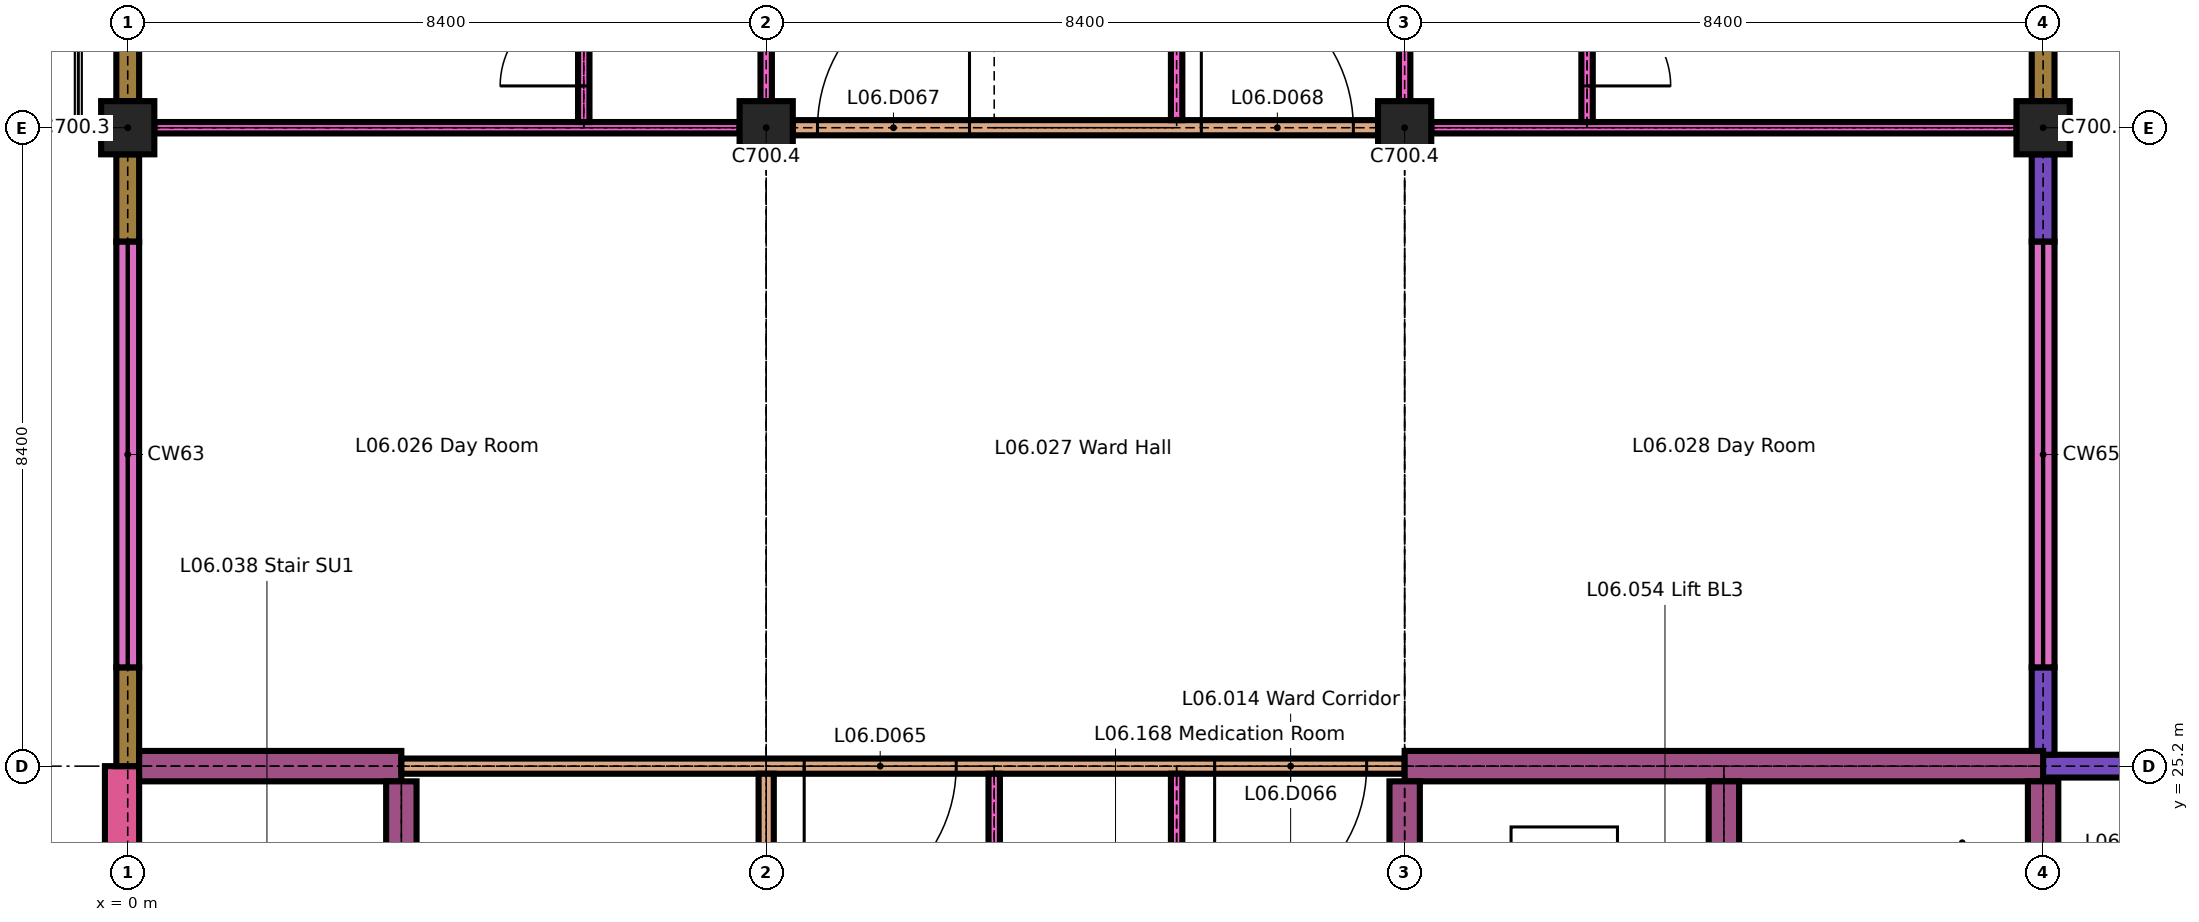
"""IFC4 building model, lengths in metres.
Left out: names, types, materials, properties, quantities, classifications, styles, units other than length and angle.
Written with IfcOpenShell. Run it as: python <this file> out.ifc"""

import sys

from ifc_helpers import new_model, si_unit, direction, frame, frame_2d, origin, origin_2d, place, context, subcontext, project, spatial, rectangle, extrude, element, fill, save


model = new_model("IFC4")
c1 = context("Model", 3, precision=1e-05, world=origin(), true_north=direction((0.0, 1.0)))
c2 = subcontext(c1, "Body", "Model", "MODEL_VIEW")
j1 = project(units=[si_unit("LENGTHUNIT", "METRE"), si_unit("PLANEANGLEUNIT", "RADIAN")], contexts=[c1])
p1 = place(None, origin())
s1 = spatial("IfcSite", under=j1, at=p1, CompositionType="ELEMENT")
p2 = place(p1, origin())
s2 = spatial("IfcBuilding", under=s1, at=p2, CompositionType="ELEMENT")
p3 = place(p2, frame((0.0, 0.0, 26.1)))
s3 = spatial("IfcBuildingStorey", under=s2, at=p3, CompositionType="ELEMENT", Elevation=26.1)
p4 = place(p3, frame((0.0, 33.6, 0.0), z_axis=(0.0, 0.0, 1.0), x_axis=(1.0, 0.0, 0.0)))
e1 = element("IfcColumn", 1, at=p4, inside=s3, PredefinedType="COLUMN", context=c2, shape_type="SweptSolid", body=[
    extrude(rectangle(XDim=0.7, YDim=0.7, at=origin_2d()), origin(), (0.0, 0.0, 1.0), 3.2),
])
for number, where, z_axis, x_axis in (
    (2, (8.4, 33.6, 0.0), (0.0, 0.0, 1.0), (1.0, 0.0, 0.0)),
    (3, (16.8, 33.6, 0.0), (0.0, 0.0, 1.0), (1.0, 0.0, 0.0)),
):
    element("IfcColumn", number, at=place(p3, frame(where, z_axis=z_axis, x_axis=x_axis)), inside=s3, PredefinedType="COLUMN", context=c2, shape_type="SweptSolid", body=[
        extrude(rectangle(XDim=0.7, YDim=0.7, at=origin_2d()), origin(), (0.0, 0.0, 1.0), 3.3),
    ])
p5 = place(p3, frame((25.2, 33.6, 0.0), z_axis=(0.0, 0.0, 1.0), x_axis=(1.0, 0.0, 0.0)))
e4 = element("IfcColumn", 4, at=p5, inside=s3, PredefinedType="COLUMN", context=c2, shape_type="SweptSolid", body=[
    extrude(rectangle(XDim=0.7, YDim=0.7, at=origin_2d()), origin(), (0.0, 0.0, 1.0), 3.2),
])
p6 = place(p3, frame((25.05, 25.2, 0.0), z_axis=(0.0, 0.0, 1.0), x_axis=(1.0, 0.0, 0.0)))
e5 = element("IfcWall", 5, at=p6, inside=s3, PredefinedType="SOLIDWALL", context=c2, shape_type="SweptSolid", body=[
    extrude(rectangle(XDim=1.45, YDim=0.3, at=frame_2d((0.725, 0.0))), origin(), (0.0, 0.0, 1.0), 3.3),
])
p7 = place(p3, frame((-0.075, 21.35, 0.0), z_axis=(0.0, 0.0, 1.0), x_axis=(0.0, 1.0, 0.0)))
e6 = element("IfcWall", 6, at=p7, inside=s3, PredefinedType="SOLIDWALL", context=c2, shape_type="SweptSolid", body=[
    extrude(rectangle(XDim=3.85, YDim=0.45, at=frame_2d((1.925, 0.0))), origin(), (0.0, 0.0, 1.0), 3.3),
])
p8 = place(p3, frame((0.0, 25.2, 0.0), z_axis=(0.0, 0.0, 1.0), x_axis=(0.0, 1.0, 0.0)))
e7 = element("IfcWall", 7, at=p8, inside=s3, PredefinedType="SOLIDWALL", context=c2, shape_type="SweptSolid", body=[
    extrude(rectangle(XDim=1.3, YDim=0.3, at=frame_2d((0.65, 0.0))), origin(), (0.0, 0.0, 1.0), 2.9),
])
p9 = place(p3, frame((0.0, 32.1, 0.0), z_axis=(0.0, 0.0, 1.0), x_axis=(0.0, 1.0, 0.0)))
e8 = element("IfcWall", 8, at=p9, inside=s3, PredefinedType="SOLIDWALL", context=c2, shape_type="SweptSolid", body=[
    extrude(rectangle(XDim=1.15, YDim=0.3, at=frame_2d((0.575, 0.0))), origin(), (0.0, 0.0, 1.0), 2.9),
])
p10 = place(p3, frame((0.0, 26.5, 0.0), z_axis=(0.0, 0.0, 1.0), x_axis=(0.0, 1.0, 0.0)))
e9 = element("IfcWall", 9, at=p10, inside=s3, PredefinedType="SOLIDWALL", context=c2, shape_type="SweptSolid", body=[
    extrude(rectangle(XDim=5.6, YDim=0.3, at=frame_2d((2.8, 0.0))), origin(), (0.0, 0.0, 1.0), 0.6),
])
p11 = place(p3, frame((0.0, 33.95, 0.0), z_axis=(0.0, 0.0, 1.0), x_axis=(0.0, 1.0, 0.0)))
e10 = element("IfcWall", 10, at=p11, inside=s3, PredefinedType="SOLIDWALL", context=c2, shape_type="SweptSolid", body=[
    extrude(rectangle(XDim=3.85, YDim=0.3, at=frame_2d((1.925, 0.0))), origin(), (0.0, 0.0, 1.0), 2.9),
])
p12 = place(p11, frame((0.7, 0.0, 0.9)))
e11 = element("IfcOpeningElement", 11, at=p12, cuts=e10, PredefinedType="OPENING", context=c2, shape_type="SweptSolid", body=[
    extrude(rectangle(XDim=2.1, YDim=1.5, at=frame_2d((1.05, 0.75))), frame((0.0, 0.16, 0.0), z_axis=(0.0, -1.0, 0.0), x_axis=(1.0, 0.0, 0.0)), (0.0, 0.0, 1.0), 0.32),
])
for number, where, z_axis, x_axis in (
    (12, (25.2, 25.35, 0.0), (0.0, 0.0, 1.0), (0.0, 1.0, 0.0)),
    (13, (25.2, 32.1, 0.0), (0.0, 0.0, 1.0), (0.0, 1.0, 0.0)),
):
    element("IfcWall", number, at=place(p3, frame(where, z_axis=z_axis, x_axis=x_axis)), inside=s3, PredefinedType="SOLIDWALL", context=c2, shape_type="SweptSolid", body=[
        extrude(rectangle(XDim=1.15, YDim=0.3, at=frame_2d((0.575, 0.0))), origin(), (0.0, 0.0, 1.0), 3.3),
    ])
p13 = place(p3, frame((25.2, 26.5, 0.0), z_axis=(0.0, 0.0, 1.0), x_axis=(0.0, 1.0, 0.0)))
e14 = element("IfcWall", 14, at=p13, inside=s3, PredefinedType="SOLIDWALL", context=c2, shape_type="SweptSolid", body=[
    extrude(rectangle(XDim=5.6, YDim=0.3, at=frame_2d((2.8, 0.0))), origin(), (0.0, 0.0, 1.0), 0.6),
])
p14 = place(p3, frame((25.2, 33.95, 0.0), z_axis=(0.0, 0.0, 1.0), x_axis=(0.0, 1.0, 0.0)))
e15 = element("IfcWall", 15, at=p14, inside=s3, PredefinedType="SOLIDWALL", context=c2, shape_type="SweptSolid", body=[
    extrude(rectangle(XDim=3.85, YDim=0.3, at=frame_2d((1.925, 0.0))), origin(), (0.0, 0.0, 1.0), 2.9),
])
p15 = place(p14, frame((0.7, 0.0, 0.9)))
e16 = element("IfcOpeningElement", 16, at=p15, cuts=e15, PredefinedType="OPENING", context=c2, shape_type="SweptSolid", body=[
    extrude(rectangle(XDim=2.1, YDim=1.5, at=frame_2d((1.05, 0.75))), frame((0.0, 0.16, 0.0), z_axis=(0.0, -1.0, 0.0), x_axis=(1.0, 0.0, 0.0)), (0.0, 0.0, 1.0), 0.32),
])
p16 = place(p3, frame((0.15, 25.2, 0.0), z_axis=(0.0, 0.0, 1.0), x_axis=(1.0, 0.0, 0.0)))
e17 = element("IfcWall", 17, at=p16, inside=s3, PredefinedType="SHEAR", context=c2, shape_type="SweptSolid", body=[
    extrude(rectangle(XDim=3.45, YDim=0.4, at=frame_2d((1.725, 0.0))), origin(), (0.0, 0.0, 1.0), 3.3),
])
p17 = place(p3, frame((3.6, 25.2, 0.0), z_axis=(0.0, 0.0, 1.0), x_axis=(1.0, 0.0, 0.0)))
e18 = element("IfcWall", 18, at=p17, inside=s3, PredefinedType="PARTITIONING", context=c2, shape_type="SweptSolid", body=[
    extrude(rectangle(XDim=13.2, YDim=0.2, at=frame_2d((6.6, 0.0))), origin(), (0.0, 0.0, 1.0), 3.3),
])
p18 = place(p17, frame((5.3, 0.0, 0.0)))
e19 = element("IfcOpeningElement", 19, at=p18, cuts=e18, PredefinedType="OPENING", context=c2, shape_type="SweptSolid", body=[
    extrude(rectangle(XDim=2.0, YDim=2.4, at=frame_2d((1.0, 1.2))), frame((0.0, 0.11, 0.0), z_axis=(0.0, -1.0, 0.0), x_axis=(1.0, 0.0, 0.0)), (0.0, 0.0, 1.0), 0.22),
])
p19 = place(p17, frame((10.7, 0.0, 0.0)))
e20 = element("IfcOpeningElement", 20, at=p19, cuts=e18, PredefinedType="OPENING", context=c2, shape_type="SweptSolid", body=[
    extrude(rectangle(XDim=2.0, YDim=2.4, at=frame_2d((1.0, 1.2))), frame((0.0, 0.11, 0.0), z_axis=(0.0, -1.0, 0.0), x_axis=(1.0, 0.0, 0.0)), (0.0, 0.0, 1.0), 0.22),
])
p20 = place(p3, frame((16.8, 25.2, 0.0), z_axis=(0.0, 0.0, 1.0), x_axis=(1.0, 0.0, 0.0)))
e21 = element("IfcWall", 21, at=p20, inside=s3, PredefinedType="SHEAR", context=c2, shape_type="SweptSolid", body=[
    extrude(rectangle(XDim=8.4, YDim=0.4, at=frame_2d((4.2, 0.0))), origin(), (0.0, 0.0, 1.0), 3.3),
])
p21 = place(p3, frame((0.35, 33.6, 0.0), z_axis=(0.0, 0.0, 1.0), x_axis=(1.0, 0.0, 0.0)))
e22 = element("IfcWall", 22, at=p21, inside=s3, PredefinedType="PARTITIONING", context=c2, shape_type="SweptSolid", body=[
    extrude(rectangle(XDim=7.7, YDim=0.15, at=frame_2d((3.85, 0.0))), origin(), (0.0, 0.0, 1.0), 3.3),
])
p22 = place(p3, frame((8.75, 33.6, 0.0), z_axis=(0.0, 0.0, 1.0), x_axis=(1.0, 0.0, 0.0)))
e23 = element("IfcWall", 23, at=p22, inside=s3, PredefinedType="PARTITIONING", context=c2, shape_type="SweptSolid", body=[
    extrude(rectangle(XDim=7.7, YDim=0.2, at=frame_2d((3.85, 0.0))), origin(), (0.0, 0.0, 1.0), 3.3),
])
p23 = place(p22, frame((0.325, 0.0, 0.0)))
e24 = element("IfcOpeningElement", 24, at=p23, cuts=e23, PredefinedType="OPENING", context=c2, shape_type="SweptSolid", body=[
    extrude(rectangle(XDim=2.0, YDim=2.4, at=frame_2d((1.0, 1.2))), frame((0.0, 0.11, 0.0), z_axis=(0.0, -1.0, 0.0), x_axis=(1.0, 0.0, 0.0)), (0.0, 0.0, 1.0), 0.22),
])
p24 = place(p22, frame((5.375, 0.0, 0.0)))
e25 = element("IfcOpeningElement", 25, at=p24, cuts=e23, PredefinedType="OPENING", context=c2, shape_type="SweptSolid", body=[
    extrude(rectangle(XDim=2.0, YDim=2.4, at=frame_2d((1.0, 1.2))), frame((0.0, 0.11, 0.0), z_axis=(0.0, -1.0, 0.0), x_axis=(1.0, 0.0, 0.0)), (0.0, 0.0, 1.0), 0.22),
])
p25 = place(p3, frame((17.15, 33.6, 0.0), z_axis=(0.0, 0.0, 1.0), x_axis=(1.0, 0.0, 0.0)))
e26 = element("IfcWall", 26, at=p25, inside=s3, PredefinedType="PARTITIONING", context=c2, shape_type="SweptSolid", body=[
    extrude(rectangle(XDim=7.7, YDim=0.15, at=frame_2d((3.85, 0.0))), origin(), (0.0, 0.0, 1.0), 3.3),
])
p26 = place(p3, frame((3.6, 17.0, 0.0), z_axis=(0.0, 0.0, 1.0), x_axis=(0.0, 1.0, 0.0)))
e27 = element("IfcWall", 27, at=p26, inside=s3, PredefinedType="SHEAR", context=c2, shape_type="SweptSolid", body=[
    extrude(rectangle(XDim=8.0, YDim=0.4, at=frame_2d((4.0, 0.0))), origin(), (0.0, 0.0, 1.0), 3.3),
])
p27 = place(p26, frame((0.4, 0.0, 0.0)))
e28 = element("IfcOpeningElement", 28, at=p27, cuts=e27, PredefinedType="OPENING", context=c2, shape_type="SweptSolid", body=[
    extrude(rectangle(XDim=1.2, YDim=2.1, at=frame_2d((0.6, 1.05))), frame((0.0, 0.21, 0.0), z_axis=(0.0, -1.0, 0.0), x_axis=(1.0, 0.0, 0.0)), (0.0, 0.0, 1.0), 0.42),
])
p28 = place(p3, frame((6.0, 33.675, 0.0), z_axis=(0.0, 0.0, 1.0), x_axis=(0.0, 1.0, 0.0)))
e29 = element("IfcWall", 29, at=p28, inside=s3, PredefinedType="PARTITIONING", context=c2, shape_type="SweptSolid", body=[
    extrude(rectangle(XDim=2.05, YDim=0.15, at=frame_2d((1.025, 0.0))), origin(), (0.0, 0.0, 1.0), 3.3),
])
p29 = place(p28, frame((0.475, 0.0, 0.0)))
e30 = element("IfcOpeningElement", 30, at=p29, cuts=e29, PredefinedType="OPENING", context=c2, shape_type="SweptSolid", body=[
    extrude(rectangle(XDim=1.1, YDim=2.1, at=frame_2d((0.55, 1.05))), frame((0.0, 0.085, 0.0), z_axis=(0.0, -1.0, 0.0), x_axis=(1.0, 0.0, 0.0)), (0.0, 0.0, 1.0), 0.17),
])
p30 = place(p3, frame((8.4, 16.9, 0.0), z_axis=(0.0, 0.0, 1.0), x_axis=(0.0, 1.0, 0.0)))
e31 = element("IfcWall", 31, at=p30, inside=s3, PredefinedType="PARTITIONING", context=c2, shape_type="SweptSolid", body=[
    extrude(rectangle(XDim=8.2, YDim=0.2, at=frame_2d((4.1, 0.0))), origin(), (0.0, 0.0, 1.0), 3.3),
])
p31 = place(p30, frame((3.1, 0.0, 0.0)))
e32 = element("IfcOpeningElement", 32, at=p31, cuts=e31, PredefinedType="OPENING", context=c2, shape_type="SweptSolid", body=[
    extrude(rectangle(XDim=2.0, YDim=2.4, at=frame_2d((1.0, 1.2))), frame((0.0, 0.11, 0.0), z_axis=(0.0, -1.0, 0.0), x_axis=(1.0, 0.0, 0.0)), (0.0, 0.0, 1.0), 0.22),
])
p32 = place(p3, frame((8.4, 33.95, 0.0), z_axis=(0.0, 0.0, 1.0), x_axis=(0.0, 1.0, 0.0)))
e33 = element("IfcWall", 33, at=p32, inside=s3, PredefinedType="PARTITIONING", context=c2, shape_type="SweptSolid", body=[
    extrude(rectangle(XDim=7.7, YDim=0.15, at=frame_2d((3.85, 0.0))), origin(), (0.0, 0.0, 1.0), 3.3),
])
p33 = place(p32, frame((2.1, 0.0, 0.0)))
e34 = element("IfcOpeningElement", 34, at=p33, cuts=e33, PredefinedType="OPENING", context=c2, shape_type="SweptSolid", body=[
    extrude(rectangle(XDim=1.5, YDim=2.4, at=frame_2d((0.75, 1.2))), frame((0.0, 0.085, 0.0), z_axis=(0.0, -1.0, 0.0), x_axis=(1.0, 0.0, 0.0)), (0.0, 0.0, 1.0), 0.17),
])
p34 = place(p32, frame((4.1, 0.0, 0.0)))
e35 = element("IfcOpeningElement", 35, at=p34, cuts=e33, PredefinedType="OPENING", context=c2, shape_type="SweptSolid", body=[
    extrude(rectangle(XDim=1.5, YDim=2.4, at=frame_2d((0.75, 1.2))), frame((0.0, 0.085, 0.0), z_axis=(0.0, -1.0, 0.0), x_axis=(1.0, 0.0, 0.0)), (0.0, 0.0, 1.0), 0.17),
])
p35 = place(p3, frame((11.4, 16.875, 0.0), z_axis=(0.0, 0.0, 1.0), x_axis=(0.0, 1.0, 0.0)))
e36 = element("IfcWall", 36, at=p35, inside=s3, PredefinedType="PARTITIONING", context=c2, shape_type="SweptSolid", body=[
    extrude(rectangle(XDim=8.225, YDim=0.15, at=frame_2d((4.113, 0.0))), origin(), (0.0, 0.0, 1.0), 3.3),
])
p36 = place(p35, frame((5.625, 0.0, 0.0)))
e37 = element("IfcOpeningElement", 37, at=p36, cuts=e36, PredefinedType="OPENING", context=c2, shape_type="SweptSolid", body=[
    extrude(rectangle(XDim=1.1, YDim=2.1, at=frame_2d((0.55, 1.05))), frame((0.0, 0.085, 0.0), z_axis=(0.0, -1.0, 0.0), x_axis=(1.0, 0.0, 0.0)), (0.0, 0.0, 1.0), 0.17),
])
p37 = place(p3, frame((13.8, 16.875, 0.0), z_axis=(0.0, 0.0, 1.0), x_axis=(0.0, 1.0, 0.0)))
e38 = element("IfcWall", 38, at=p37, inside=s3, PredefinedType="PARTITIONING", context=c2, shape_type="SweptSolid", body=[
    extrude(rectangle(XDim=8.225, YDim=0.15, at=frame_2d((4.113, 0.0))), origin(), (0.0, 0.0, 1.0), 3.3),
])
p38 = place(p37, frame((1.512, 0.0, 0.0)))
e39 = element("IfcOpeningElement", 39, at=p38, cuts=e38, PredefinedType="OPENING", context=c2, shape_type="SweptSolid", body=[
    extrude(rectangle(XDim=1.1, YDim=2.1, at=frame_2d((0.55, 1.05))), frame((0.0, 0.085, 0.0), z_axis=(0.0, -1.0, 0.0), x_axis=(1.0, 0.0, 0.0)), (0.0, 0.0, 1.0), 0.17),
])
p39 = place(p3, frame((13.8, 33.7, 0.0), z_axis=(0.0, 0.0, 1.0), x_axis=(0.0, 1.0, 0.0)))
e40 = element("IfcWall", 40, at=p39, inside=s3, PredefinedType="PARTITIONING", context=c2, shape_type="SweptSolid", body=[
    extrude(rectangle(XDim=33.4, YDim=0.15, at=frame_2d((16.7, 0.0))), origin(), (0.0, 0.0, 1.0), 3.3),
])
p40 = place(p39, frame((17.65, 0.0, 0.0)))
e41 = element("IfcOpeningElement", 41, at=p40, cuts=e40, PredefinedType="OPENING", context=c2, shape_type="SweptSolid", body=[
    extrude(rectangle(XDim=0.9, YDim=2.1, at=frame_2d((0.45, 1.05))), frame((0.0, 0.085, 0.0), z_axis=(0.0, -1.0, 0.0), x_axis=(1.0, 0.0, 0.0)), (0.0, 0.0, 1.0), 0.17),
])
p41 = place(p3, frame((16.8, 21.6, 0.0), z_axis=(0.0, 0.0, 1.0), x_axis=(0.0, 1.0, 0.0)))
e42 = element("IfcWall", 42, at=p41, inside=s3, PredefinedType="SHEAR", context=c2, shape_type="SweptSolid", body=[
    extrude(rectangle(XDim=3.4, YDim=0.4, at=frame_2d((1.7, 0.0))), origin(), (0.0, 0.0, 1.0), 3.3),
])
p42 = place(p3, frame((16.8, 33.95, 0.0), z_axis=(0.0, 0.0, 1.0), x_axis=(0.0, 1.0, 0.0)))
e43 = element("IfcWall", 43, at=p42, inside=s3, PredefinedType="PARTITIONING", context=c2, shape_type="SweptSolid", body=[
    extrude(rectangle(XDim=8.05, YDim=0.15, at=frame_2d((4.025, 0.0))), origin(), (0.0, 0.0, 1.0), 3.3),
])
p43 = place(p42, frame((2.1, 0.0, 0.0)))
e44 = element("IfcOpeningElement", 44, at=p43, cuts=e43, PredefinedType="OPENING", context=c2, shape_type="SweptSolid", body=[
    extrude(rectangle(XDim=1.5, YDim=2.4, at=frame_2d((0.75, 1.2))), frame((0.0, 0.085, 0.0), z_axis=(0.0, -1.0, 0.0), x_axis=(1.0, 0.0, 0.0)), (0.0, 0.0, 1.0), 0.17),
])
p44 = place(p42, frame((4.1, 0.0, 0.0)))
e45 = element("IfcOpeningElement", 45, at=p44, cuts=e43, PredefinedType="OPENING", context=c2, shape_type="SweptSolid", body=[
    extrude(rectangle(XDim=1.5, YDim=2.4, at=frame_2d((0.75, 1.2))), frame((0.0, 0.085, 0.0), z_axis=(0.0, -1.0, 0.0), x_axis=(1.0, 0.0, 0.0)), (0.0, 0.0, 1.0), 0.17),
])
p45 = place(p3, frame((19.2, 33.675, 0.0), z_axis=(0.0, 0.0, 1.0), x_axis=(0.0, 1.0, 0.0)))
e46 = element("IfcWall", 46, at=p45, inside=s3, PredefinedType="PARTITIONING", context=c2, shape_type="SweptSolid", body=[
    extrude(rectangle(XDim=2.05, YDim=0.15, at=frame_2d((1.025, 0.0))), origin(), (0.0, 0.0, 1.0), 3.3),
])
p46 = place(p45, frame((0.475, 0.0, 0.0)))
e47 = element("IfcOpeningElement", 47, at=p46, cuts=e46, PredefinedType="OPENING", context=c2, shape_type="SweptSolid", body=[
    extrude(rectangle(XDim=1.1, YDim=2.1, at=frame_2d((0.55, 1.05))), frame((0.0, 0.085, 0.0), z_axis=(0.0, -1.0, 0.0), x_axis=(1.0, 0.0, 0.0)), (0.0, 0.0, 1.0), 0.17),
])
p47 = place(p3, frame((21.0, 21.8, 0.0), z_axis=(0.0, 0.0, 1.0), x_axis=(0.0, 1.0, 0.0)))
e48 = element("IfcWall", 48, at=p47, inside=s3, PredefinedType="SHEAR", context=c2, shape_type="SweptSolid", body=[
    extrude(rectangle(XDim=3.2, YDim=0.4, at=frame_2d((1.6, 0.0))), origin(), (0.0, 0.0, 1.0), 3.3),
])
p48 = place(p3, frame((25.2, 21.6, 0.0), z_axis=(0.0, 0.0, 1.0), x_axis=(0.0, 1.0, 0.0)))
e49 = element("IfcWall", 49, at=p48, inside=s3, PredefinedType="SHEAR", context=c2, shape_type="SweptSolid", body=[
    extrude(rectangle(XDim=3.4, YDim=0.4, at=frame_2d((1.7, 0.0))), origin(), (0.0, 0.0, 1.0), 3.3),
])
p49 = place(p18, origin())
e50 = element("IfcDoor", 50, at=p49, inside=s3, OperationType="SINGLE_SWING_LEFT", PredefinedType="DOOR", context=c2, shape_type="SweptSolid", body=[
    extrude(rectangle(XDim=2.0, YDim=2.4, at=frame_2d((1.0, 1.2))), frame((0.0, 0.03, 0.0), z_axis=(0.0, -1.0, 0.0), x_axis=(1.0, 0.0, 0.0)), (0.0, 0.0, 1.0), 0.06),
])
fill(e19, e50)
p50 = place(p19, origin())
e51 = element("IfcDoor", 51, at=p50, inside=s3, OperationType="SINGLE_SWING_LEFT", PredefinedType="DOOR", context=c2, shape_type="SweptSolid", body=[
    extrude(rectangle(XDim=2.0, YDim=2.4, at=frame_2d((1.0, 1.2))), frame((0.0, 0.03, 0.0), z_axis=(0.0, -1.0, 0.0), x_axis=(1.0, 0.0, 0.0)), (0.0, 0.0, 1.0), 0.06),
])
fill(e20, e51)
p51 = place(p23, origin())
e52 = element("IfcDoor", 52, at=p51, inside=s3, OperationType="SINGLE_SWING_LEFT", PredefinedType="DOOR", context=c2, shape_type="SweptSolid", body=[
    extrude(rectangle(XDim=2.0, YDim=2.4, at=frame_2d((1.0, 1.2))), frame((0.0, 0.03, 0.0), z_axis=(0.0, -1.0, 0.0), x_axis=(1.0, 0.0, 0.0)), (0.0, 0.0, 1.0), 0.06),
])
fill(e24, e52)
p52 = place(p24, origin())
e53 = element("IfcDoor", 53, at=p52, inside=s3, OperationType="SINGLE_SWING_RIGHT", PredefinedType="DOOR", context=c2, shape_type="SweptSolid", body=[
    extrude(rectangle(XDim=2.0, YDim=2.4, at=frame_2d((1.0, 1.2))), frame((0.0, 0.03, 0.0), z_axis=(0.0, -1.0, 0.0), x_axis=(1.0, 0.0, 0.0)), (0.0, 0.0, 1.0), 0.06),
])
fill(e25, e53)
p53 = place(p29, origin())
e54 = element("IfcDoor", 54, at=p53, inside=s3, OperationType="SINGLE_SWING_RIGHT", PredefinedType="DOOR", context=c2, shape_type="SweptSolid", body=[
    extrude(rectangle(XDim=1.1, YDim=2.1, at=frame_2d((0.55, 1.05))), frame((0.0, 0.025, 0.0), z_axis=(0.0, -1.0, 0.0), x_axis=(1.0, 0.0, 0.0)), (0.0, 0.0, 1.0), 0.05),
])
fill(e30, e54)
p54 = place(p46, origin())
e55 = element("IfcDoor", 55, at=p54, inside=s3, OperationType="SINGLE_SWING_LEFT", PredefinedType="DOOR", context=c2, shape_type="SweptSolid", body=[
    extrude(rectangle(XDim=1.1, YDim=2.1, at=frame_2d((0.55, 1.05))), frame((0.0, 0.025, 0.0), z_axis=(0.0, -1.0, 0.0), x_axis=(1.0, 0.0, 0.0)), (0.0, 0.0, 1.0), 0.05),
])
fill(e47, e55)
save(model, sys.argv[1])
